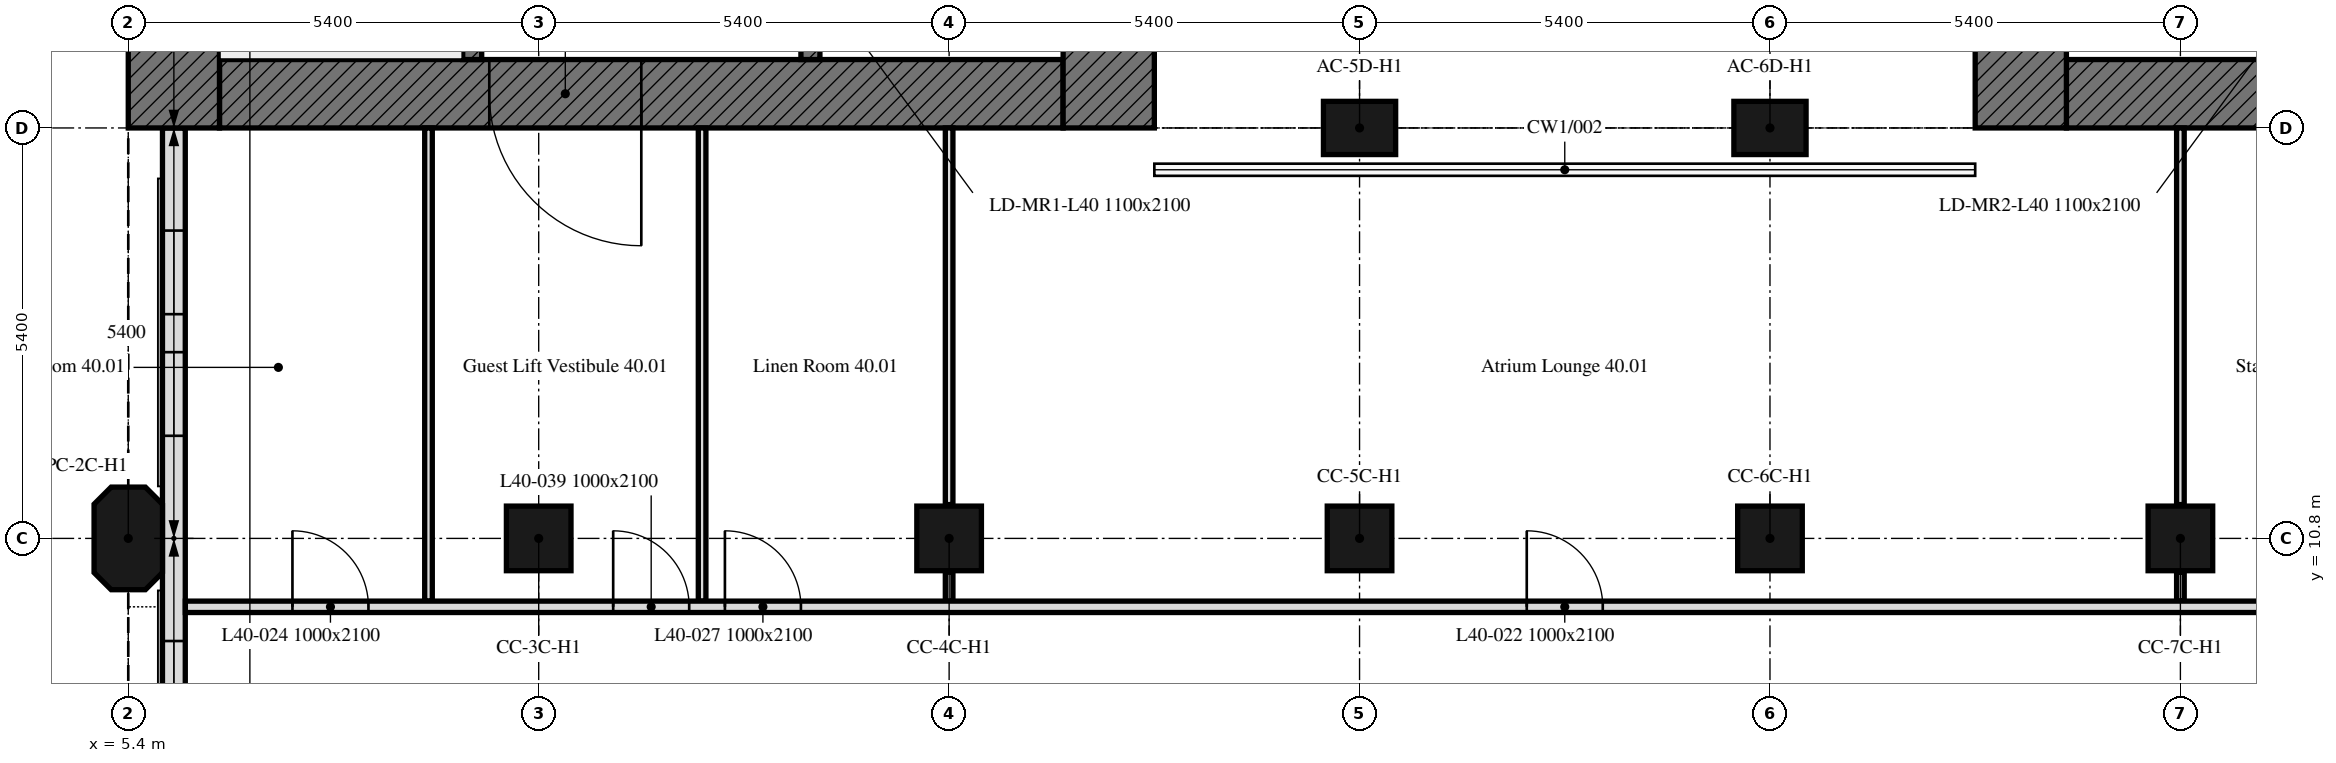
"""IFC4 building model, lengths in metres.
Left out: names, types, materials, properties, quantities, classifications, styles, units other than length and angle.
Written with IfcOpenShell. Run it as: python <this file> out.ifc"""

import sys

from ifc_helpers import new_model, si_unit, direction, frame, frame_2d, origin, origin_2d, place, context, subcontext, project, spatial, polyline, rectangle, outline, extrude, element, fill, save


model = new_model("IFC4")
c1 = context("Model", 3, precision=1e-05, world=origin(), true_north=direction((0.0, 1.0)))
c2 = subcontext(c1, "Body", "Model", "MODEL_VIEW")
j1 = project(units=[si_unit("LENGTHUNIT", "METRE"), si_unit("PLANEANGLEUNIT", "RADIAN")], contexts=[c1])
p1 = place(None, origin())
s1 = spatial("IfcSite", under=j1, at=p1, CompositionType="ELEMENT")
p2 = place(p1, origin())
s2 = spatial("IfcBuilding", under=s1, at=p2, CompositionType="ELEMENT")
p3 = place(p2, frame((0.0, 0.0, 169.3)))
s3 = spatial("IfcBuildingStorey", under=s2, at=p3, CompositionType="ELEMENT", Elevation=169.3)
p4 = place(p3, frame((5.4, 10.8, 0.0), z_axis=(0.0, 0.0, 1.0), x_axis=(0.0, 1.0, 0.0)))
e1 = element("IfcColumn", 1, at=p4, inside=s3, PredefinedType="COLUMN", context=c2, shape_type="SweptSolid", body=[
    extrude(outline(polyline([(-0.45, -0.45), (0.45, -0.45), (0.675, -0.225), (0.675, 0.225), (0.45, 0.45), (-0.45, 0.45), (-0.675, 0.225), (-0.675, -0.225), (-0.45, -0.45)])), origin(), (0.0, 0.0, 1.0), 3.0),
])
for number, where, z_axis, x_axis in (
    (2, (10.8, 10.8, 0.0), (0.0, 0.0, 1.0), (1.0, 0.0, 0.0)),
    (3, (16.2, 10.8, 0.0), (0.0, 0.0, 1.0), (1.0, 0.0, 0.0)),
    (4, (21.6, 10.8, 0.0), (0.0, 0.0, 1.0), (1.0, 0.0, 0.0)),
    (5, (27.0, 10.8, 0.0), (0.0, 0.0, 1.0), (1.0, 0.0, 0.0)),
    (6, (32.4, 10.8, 0.0), (0.0, 0.0, 1.0), (1.0, 0.0, 0.0)),
):
    element("IfcColumn", number, at=place(p3, frame(where, z_axis=z_axis, x_axis=x_axis)), inside=s3, PredefinedType="COLUMN", context=c2, shape_type="SweptSolid", body=[
        extrude(rectangle(XDim=0.85, YDim=0.85, at=origin_2d()), origin(), (0.0, 0.0, 1.0), 3.0),
    ])
for number, where, z_axis, x_axis in (
    (7, (21.6, 16.2, 0.0), (0.0, 0.0, 1.0), (1.0, 0.0, 0.0)),
    (8, (27.0, 16.2, 0.0), (0.0, 0.0, 1.0), (1.0, 0.0, 0.0)),
):
    element("IfcColumn", number, at=place(p3, frame(where, z_axis=z_axis, x_axis=x_axis)), inside=s3, PredefinedType="COLUMN", context=c2, shape_type="SweptSolid", body=[
        extrude(rectangle(XDim=0.95, YDim=0.7, at=origin_2d()), origin(), (0.0, 0.0, 1.0), 3.0),
    ])
p5 = place(p3, frame((6.0, 16.2, 0.0), z_axis=(0.0, 0.0, 1.0), x_axis=(0.0, -1.0, 0.0)))
e9 = element("IfcWall", 9, at=p5, inside=s3, PredefinedType="SOLIDWALL", context=c2, shape_type="SweptSolid", body=[
    extrude(rectangle(XDim=10.614, YDim=0.3, at=frame_2d((5.307, 0.0))), origin(), (0.0, 0.0, 1.0), 3.0),
])
p6 = place(p5, frame((1.35, 0.0, 0.9)))
e10 = element("IfcOpeningElement", 10, at=p6, cuts=e9, PredefinedType="OPENING", context=c2, shape_type="SweptSolid", body=[
    extrude(rectangle(XDim=1.1, YDim=1.7, at=frame_2d((0.55, 0.85))), frame((0.0, 0.16, 0.0), z_axis=(0.0, -1.0, 0.0), x_axis=(1.0, 0.0, 0.0)), (0.0, 0.0, 1.0), 0.32),
])
p7 = place(p5, frame((2.95, 0.0, 0.9)))
e11 = element("IfcOpeningElement", 11, at=p7, cuts=e9, PredefinedType="OPENING", context=c2, shape_type="SweptSolid", body=[
    extrude(rectangle(XDim=1.1, YDim=1.7, at=frame_2d((0.55, 0.85))), frame((0.0, 0.16, 0.0), z_axis=(0.0, -1.0, 0.0), x_axis=(1.0, 0.0, 0.0)), (0.0, 0.0, 1.0), 0.32),
])
p8 = place(p5, frame((6.75, 0.0, 0.9)))
e12 = element("IfcOpeningElement", 12, at=p8, cuts=e9, PredefinedType="OPENING", context=c2, shape_type="SweptSolid", body=[
    extrude(rectangle(XDim=1.1, YDim=1.7, at=frame_2d((0.55, 0.85))), frame((0.0, 0.16, 0.0), z_axis=(0.0, -1.0, 0.0), x_axis=(1.0, 0.0, 0.0)), (0.0, 0.0, 1.0), 0.32),
])
p9 = place(p5, frame((8.35, 0.0, 0.9)))
e13 = element("IfcOpeningElement", 13, at=p9, cuts=e9, PredefinedType="OPENING", context=c2, shape_type="SweptSolid", body=[
    extrude(rectangle(XDim=1.1, YDim=1.7, at=frame_2d((0.55, 0.85))), frame((0.0, 0.16, 0.0), z_axis=(0.0, -1.0, 0.0), x_axis=(1.0, 0.0, 0.0)), (0.0, 0.0, 1.0), 0.32),
])
p10 = place(p3, frame((17.7, 16.65, 0.0), z_axis=(0.0, 0.0, 1.0), x_axis=(-1.0, 0.0, 0.0)))
e14 = element("IfcWall", 14, at=p10, inside=s3, PredefinedType="SOLIDWALL", context=c2, shape_type="SweptSolid", body=[
    extrude(rectangle(XDim=11.1, YDim=0.9, at=frame_2d((5.55, 0.0))), origin(), (0.0, 0.0, 1.0), 3.0),
])
p11 = place(p10, frame((5.55, 0.0, 0.0)))
e15 = element("IfcOpeningElement", 15, at=p11, cuts=e14, PredefinedType="OPENING", context=c2, shape_type="SweptSolid", body=[
    extrude(rectangle(XDim=2.0, YDim=2.4, at=frame_2d((1.0, 1.2))), frame((0.0, 0.45, 0.0), z_axis=(0.0, -1.0, 0.0), x_axis=(1.0, 0.0, 0.0)), (0.0, 0.0, 1.0), 0.9),
])
for number, where, z_axis, x_axis in (
    (16, (6.0, 16.2, 0.0), (0.0, 0.0, 1.0), (0.0, 1.0, 0.0)),
    (17, (18.3, 32.4, 0.0), (0.0, 0.0, 1.0), (0.0, -1.0, 0.0)),
):
    element("IfcWall", number, at=place(p3, frame(where, z_axis=z_axis, x_axis=x_axis)), inside=s3, PredefinedType="SOLIDWALL", context=c2, shape_type="SweptSolid", body=[
        extrude(rectangle(XDim=16.2, YDim=1.2, at=frame_2d((8.1, 0.0))), origin(), (0.0, 0.0, 1.0), 3.0),
    ])
p12 = place(p3, frame((9.925, 17.1, 0.0), z_axis=(0.0, 0.0, 1.0), x_axis=(0.0, 1.0, 0.0)))
e18 = element("IfcWall", 18, at=p12, inside=s3, PredefinedType="SOLIDWALL", context=c2, shape_type="SweptSolid", body=[
    extrude(rectangle(XDim=14.4, YDim=0.25, at=frame_2d((7.2, 0.0))), origin(), (0.0, 0.0, 1.0), 3.0),
])
p13 = place(p12, frame((4.6, 0.0, 0.0)))
e19 = element("IfcOpeningElement", 19, at=p13, cuts=e18, PredefinedType="OPENING", context=c2, shape_type="SweptSolid", body=[
    extrude(rectangle(XDim=1.0, YDim=2.1, at=frame_2d((0.5, 1.05))), frame((0.0, 0.125, 0.0), z_axis=(0.0, -1.0, 0.0), x_axis=(1.0, 0.0, 0.0)), (0.0, 0.0, 1.0), 0.25),
])
p14 = place(p12, frame((7.062, 0.0, 0.0)))
e20 = element("IfcOpeningElement", 20, at=p14, cuts=e18, PredefinedType="OPENING", context=c2, shape_type="SweptSolid", body=[
    extrude(rectangle(XDim=1.2, YDim=2.1, at=frame_2d((0.6, 1.05))), frame((0.0, 0.125, 0.0), z_axis=(0.0, -1.0, 0.0), x_axis=(1.0, 0.0, 0.0)), (0.0, 0.0, 1.0), 0.25),
])
p15 = place(p12, frame((10.106, 0.0, 0.0)))
e21 = element("IfcOpeningElement", 21, at=p15, cuts=e18, PredefinedType="OPENING", context=c2, shape_type="SweptSolid", body=[
    extrude(rectangle(XDim=0.9, YDim=2.1, at=frame_2d((0.45, 1.05))), frame((0.0, 0.125, 0.0), z_axis=(0.0, -1.0, 0.0), x_axis=(1.0, 0.0, 0.0)), (0.0, 0.0, 1.0), 0.25),
])
p16 = place(p12, frame((12.048, 0.0, 0.0)))
e22 = element("IfcOpeningElement", 22, at=p16, cuts=e18, PredefinedType="OPENING", context=c2, shape_type="SweptSolid", body=[
    extrude(rectangle(XDim=0.9, YDim=2.1, at=frame_2d((0.45, 1.05))), frame((0.0, 0.125, 0.0), z_axis=(0.0, -1.0, 0.0), x_axis=(1.0, 0.0, 0.0)), (0.0, 0.0, 1.0), 0.25),
])
p17 = place(p12, frame((13.354, 0.0, 0.0)))
e23 = element("IfcOpeningElement", 23, at=p17, cuts=e18, PredefinedType="OPENING", context=c2, shape_type="SweptSolid", body=[
    extrude(rectangle(XDim=0.9, YDim=2.1, at=frame_2d((0.45, 1.05))), frame((0.0, 0.125, 0.0), z_axis=(0.0, -1.0, 0.0), x_axis=(1.0, 0.0, 0.0)), (0.0, 0.0, 1.0), 0.25),
])
p18 = place(p3, frame((14.375, 17.1, 0.0), z_axis=(0.0, 0.0, 1.0), x_axis=(0.0, 1.0, 0.0)))
e24 = element("IfcWall", 24, at=p18, inside=s3, PredefinedType="SOLIDWALL", context=c2, shape_type="SweptSolid", body=[
    extrude(rectangle(XDim=14.4, YDim=0.25, at=frame_2d((7.2, 0.0))), origin(), (0.0, 0.0, 1.0), 3.0),
])
p19 = place(p18, frame((13.15, 0.0, 0.0)))
e25 = element("IfcOpeningElement", 25, at=p19, cuts=e24, PredefinedType="OPENING", context=c2, shape_type="SweptSolid", body=[
    extrude(rectangle(XDim=1.0, YDim=2.1, at=frame_2d((0.5, 1.05))), frame((0.0, 0.125, 0.0), z_axis=(0.0, -1.0, 0.0), x_axis=(1.0, 0.0, 0.0)), (0.0, 0.0, 1.0), 0.25),
])
p20 = place(p18, frame((0.6, 0.0, 0.0)))
e26 = element("IfcOpeningElement", 26, at=p20, cuts=e24, PredefinedType="OPENING", context=c2, shape_type="SweptSolid", body=[
    extrude(rectangle(XDim=1.1, YDim=2.1, at=frame_2d((0.55, 1.05))), frame((0.0, 0.125, 0.0), z_axis=(0.0, -1.0, 0.0), x_axis=(1.0, 0.0, 0.0)), (0.0, 0.0, 1.0), 0.25),
])
p21 = place(p18, frame((3.25, 0.0, 0.0)))
e27 = element("IfcOpeningElement", 27, at=p21, cuts=e24, PredefinedType="OPENING", context=c2, shape_type="SweptSolid", body=[
    extrude(rectangle(XDim=0.9, YDim=2.1, at=frame_2d((0.45, 1.05))), frame((0.0, 0.125, 0.0), z_axis=(0.0, -1.0, 0.0), x_axis=(1.0, 0.0, 0.0)), (0.0, 0.0, 1.0), 0.25),
])
p22 = place(p3, frame((42.0, 16.65, 0.0), z_axis=(0.0, 0.0, 1.0), x_axis=(-1.0, 0.0, 0.0)))
e28 = element("IfcWall", 28, at=p22, inside=s3, PredefinedType="SOLIDWALL", context=c2, shape_type="SweptSolid", body=[
    extrude(rectangle(XDim=11.1, YDim=0.9, at=frame_2d((5.55, 0.0))), origin(), (0.0, 0.0, 1.0), 3.0),
])
p23 = place(p22, frame((3.55, 0.0, 0.0)))
e29 = element("IfcOpeningElement", 29, at=p23, cuts=e28, PredefinedType="OPENING", context=c2, shape_type="SweptSolid", body=[
    extrude(rectangle(XDim=2.0, YDim=2.4, at=frame_2d((1.0, 1.2))), frame((0.0, 0.45, 0.0), z_axis=(0.0, -1.0, 0.0), x_axis=(1.0, 0.0, 0.0)), (0.0, 0.0, 1.0), 0.9),
])
p24 = place(p3, frame((30.3, 16.2, 0.0), z_axis=(0.0, 0.0, 1.0), x_axis=(0.0, 1.0, 0.0)))
e30 = element("IfcWall", 30, at=p24, inside=s3, PredefinedType="SOLIDWALL", context=c2, shape_type="SweptSolid", body=[
    extrude(rectangle(XDim=16.2, YDim=1.2, at=frame_2d((8.1, 0.0))), origin(), (0.0, 0.0, 1.0), 3.0),
])
p25 = place(p3, frame((16.2, 16.2, 0.0), z_axis=(0.0, 0.0, 1.0), x_axis=(0.0, -1.0, 0.0)))
e31 = element("IfcWall", 31, at=p25, inside=s3, PredefinedType="PARTITIONING", context=c2, shape_type="SweptSolid", body=[
    extrude(rectangle(XDim=4.955, YDim=0.1, at=frame_2d((2.478, 0.0))), origin(), (0.0, 0.0, 1.0), 2.4),
])
for number, where, z_axis, x_axis in (
    (32, (16.2, 10.355, 0.0), (0.0, 0.0, 1.0), (0.0, -1.0, 0.0)),
    (33, (32.4, 9.975, 0.0), (0.0, 0.0, 1.0), (0.0, 1.0, 0.0)),
):
    element("IfcWall", number, at=place(p3, frame(where, z_axis=z_axis, x_axis=x_axis)), inside=s3, PredefinedType="PARTITIONING", context=c2, shape_type="SweptSolid", body=[
        extrude(rectangle(XDim=0.38, YDim=0.1, at=frame_2d((0.19, 0.0))), origin(), (0.0, 0.0, 1.0), 2.4),
    ])
p26 = place(p3, frame((32.4, 11.245, 0.0), z_axis=(0.0, 0.0, 1.0), x_axis=(0.0, 1.0, 0.0)))
e34 = element("IfcWall", 34, at=p26, inside=s3, PredefinedType="PARTITIONING", context=c2, shape_type="SweptSolid", body=[
    extrude(rectangle(XDim=4.955, YDim=0.1, at=frame_2d((2.478, 0.0))), origin(), (0.0, 0.0, 1.0), 2.4),
])
for number, where, z_axis, x_axis in (
    (35, (9.35, 16.2, 0.0), (0.0, 0.0, 1.0), (0.0, -1.0, 0.0)),
    (36, (12.95, 9.975, 0.0), (0.0, 0.0, 1.0), (0.0, 1.0, 0.0)),
):
    element("IfcWall", number, at=place(p3, frame(where, z_axis=z_axis, x_axis=x_axis)), inside=s3, PredefinedType="PARTITIONING", context=c2, shape_type="SweptSolid", body=[
        extrude(rectangle(XDim=6.225, YDim=0.1, at=frame_2d((3.112, 0.0))), origin(), (0.0, 0.0, 1.0), 3.0),
    ])
p27 = place(p3, frame((6.151, 9.9, 0.0), z_axis=(0.0, 0.0, 1.0), x_axis=(1.0, 0.0, 0.0)))
e37 = element("IfcWall", 37, at=p27, inside=s3, PredefinedType="PARTITIONING", context=c2, shape_type="SweptSolid", body=[
    extrude(rectangle(XDim=36.974, YDim=0.15, at=frame_2d((18.487, 0.0))), origin(), (0.0, 0.0, 1.0), 2.4),
])
p28 = place(p27, frame((17.649, 0.0, 0.0)))
e38 = element("IfcOpeningElement", 38, at=p28, cuts=e37, PredefinedType="OPENING", context=c2, shape_type="SweptSolid", body=[
    extrude(rectangle(XDim=1.0, YDim=2.1, at=frame_2d((0.5, 1.05))), frame((0.0, 0.075, 0.0), z_axis=(0.0, -1.0, 0.0), x_axis=(1.0, 0.0, 0.0)), (0.0, 0.0, 1.0), 0.15),
])
p29 = place(p27, frame((1.409, 0.0, 0.0)))
e39 = element("IfcOpeningElement", 39, at=p29, cuts=e37, PredefinedType="OPENING", context=c2, shape_type="SweptSolid", body=[
    extrude(rectangle(XDim=1.0, YDim=2.1, at=frame_2d((0.5, 1.05))), frame((0.0, 0.075, 0.0), z_axis=(0.0, -1.0, 0.0), x_axis=(1.0, 0.0, 0.0)), (0.0, 0.0, 1.0), 0.15),
])
p30 = place(p27, frame((28.199, 0.0, 0.0)))
e40 = element("IfcOpeningElement", 40, at=p30, cuts=e37, PredefinedType="OPENING", context=c2, shape_type="SweptSolid", body=[
    extrude(rectangle(XDim=1.0, YDim=2.1, at=frame_2d((0.5, 1.05))), frame((0.0, 0.075, 0.0), z_axis=(0.0, -1.0, 0.0), x_axis=(1.0, 0.0, 0.0)), (0.0, 0.0, 1.0), 0.15),
])
p31 = place(p27, frame((7.099, 0.0, 0.0)))
e41 = element("IfcOpeningElement", 41, at=p31, cuts=e37, PredefinedType="OPENING", context=c2, shape_type="SweptSolid", body=[
    extrude(rectangle(XDim=1.0, YDim=2.1, at=frame_2d((0.5, 1.05))), frame((0.0, 0.075, 0.0), z_axis=(0.0, -1.0, 0.0), x_axis=(1.0, 0.0, 0.0)), (0.0, 0.0, 1.0), 0.15),
])
p32 = place(p27, frame((5.629, 0.0, 0.0)))
e42 = element("IfcOpeningElement", 42, at=p32, cuts=e37, PredefinedType="OPENING", context=c2, shape_type="SweptSolid", body=[
    extrude(rectangle(XDim=1.0, YDim=2.1, at=frame_2d((0.5, 1.05))), frame((0.0, 0.075, 0.0), z_axis=(0.0, -1.0, 0.0), x_axis=(1.0, 0.0, 0.0)), (0.0, 0.0, 1.0), 0.15),
])
p33 = place(p27, frame((29.669, 0.0, 0.0)))
e43 = element("IfcOpeningElement", 43, at=p33, cuts=e37, PredefinedType="OPENING", context=c2, shape_type="SweptSolid", body=[
    extrude(rectangle(XDim=1.0, YDim=2.1, at=frame_2d((0.5, 1.05))), frame((0.0, 0.075, 0.0), z_axis=(0.0, -1.0, 0.0), x_axis=(1.0, 0.0, 0.0)), (0.0, 0.0, 1.0), 0.15),
])
p34 = place(p6, origin())
e44 = element("IfcWindow", 44, at=p34, inside=s3, PartitioningType="SINGLE_PANEL", PredefinedType="WINDOW", context=c2, shape_type="SweptSolid", body=[
    extrude(rectangle(XDim=1.1, YDim=1.7, at=frame_2d((0.55, 0.85))), frame((0.0, 0.03, 0.0), z_axis=(0.0, -1.0, 0.0), x_axis=(1.0, 0.0, 0.0)), (0.0, 0.0, 1.0), 0.06),
])
fill(e10, e44)
p35 = place(p7, origin())
e45 = element("IfcWindow", 45, at=p35, inside=s3, PartitioningType="SINGLE_PANEL", PredefinedType="WINDOW", context=c2, shape_type="SweptSolid", body=[
    extrude(rectangle(XDim=1.1, YDim=1.7, at=frame_2d((0.55, 0.85))), frame((0.0, 0.03, 0.0), z_axis=(0.0, -1.0, 0.0), x_axis=(1.0, 0.0, 0.0)), (0.0, 0.0, 1.0), 0.06),
])
fill(e11, e45)
p36 = place(p8, origin())
e46 = element("IfcWindow", 46, at=p36, inside=s3, PartitioningType="SINGLE_PANEL", PredefinedType="WINDOW", context=c2, shape_type="SweptSolid", body=[
    extrude(rectangle(XDim=1.1, YDim=1.7, at=frame_2d((0.55, 0.85))), frame((0.0, 0.03, 0.0), z_axis=(0.0, -1.0, 0.0), x_axis=(1.0, 0.0, 0.0)), (0.0, 0.0, 1.0), 0.06),
])
fill(e12, e46)
p37 = place(p11, origin())
e47 = element("IfcDoor", 47, at=p37, inside=s3, OperationType="DOUBLE_DOOR_SINGLE_SWING", PredefinedType="DOOR", context=c2, shape_type="SweptSolid", body=[
    extrude(rectangle(XDim=2.0, YDim=2.4, at=frame_2d((1.0, 1.2))), frame((0.0, 0.025, 0.0), z_axis=(0.0, -1.0, 0.0), x_axis=(1.0, 0.0, 0.0)), (0.0, 0.0, 1.0), 0.05),
])
fill(e15, e47)
p38 = place(p28, origin())
e48 = element("IfcDoor", 48, at=p38, inside=s3, OperationType="SINGLE_SWING_LEFT", PredefinedType="DOOR", context=c2, shape_type="SweptSolid", body=[
    extrude(rectangle(XDim=1.0, YDim=2.1, at=frame_2d((0.5, 1.05))), frame((0.0, 0.025, 0.0), z_axis=(0.0, -1.0, 0.0), x_axis=(1.0, 0.0, 0.0)), (0.0, 0.0, 1.0), 0.05),
])
fill(e38, e48)
p39 = place(p29, origin())
e49 = element("IfcDoor", 49, at=p39, inside=s3, OperationType="SINGLE_SWING_RIGHT", PredefinedType="DOOR", context=c2, shape_type="SweptSolid", body=[
    extrude(rectangle(XDim=1.0, YDim=2.1, at=frame_2d((0.5, 1.05))), frame((0.0, 0.025, 0.0), z_axis=(0.0, -1.0, 0.0), x_axis=(1.0, 0.0, 0.0)), (0.0, 0.0, 1.0), 0.05),
])
fill(e39, e49)
p40 = place(p31, origin())
e50 = element("IfcDoor", 50, at=p40, inside=s3, OperationType="SINGLE_SWING_LEFT", PredefinedType="DOOR", context=c2, shape_type="SweptSolid", body=[
    extrude(rectangle(XDim=1.0, YDim=2.1, at=frame_2d((0.5, 1.05))), frame((0.0, 0.025, 0.0), z_axis=(0.0, -1.0, 0.0), x_axis=(1.0, 0.0, 0.0)), (0.0, 0.0, 1.0), 0.05),
])
fill(e41, e50)
p41 = place(p32, origin())
e51 = element("IfcDoor", 51, at=p41, inside=s3, OperationType="SINGLE_SWING_RIGHT", PredefinedType="DOOR", context=c2, shape_type="SweptSolid", body=[
    extrude(rectangle(XDim=1.0, YDim=2.1, at=frame_2d((0.5, 1.05))), frame((0.0, 0.025, 0.0), z_axis=(0.0, -1.0, 0.0), x_axis=(1.0, 0.0, 0.0)), (0.0, 0.0, 1.0), 0.05),
])
fill(e42, e51)
save(model, sys.argv[1])
